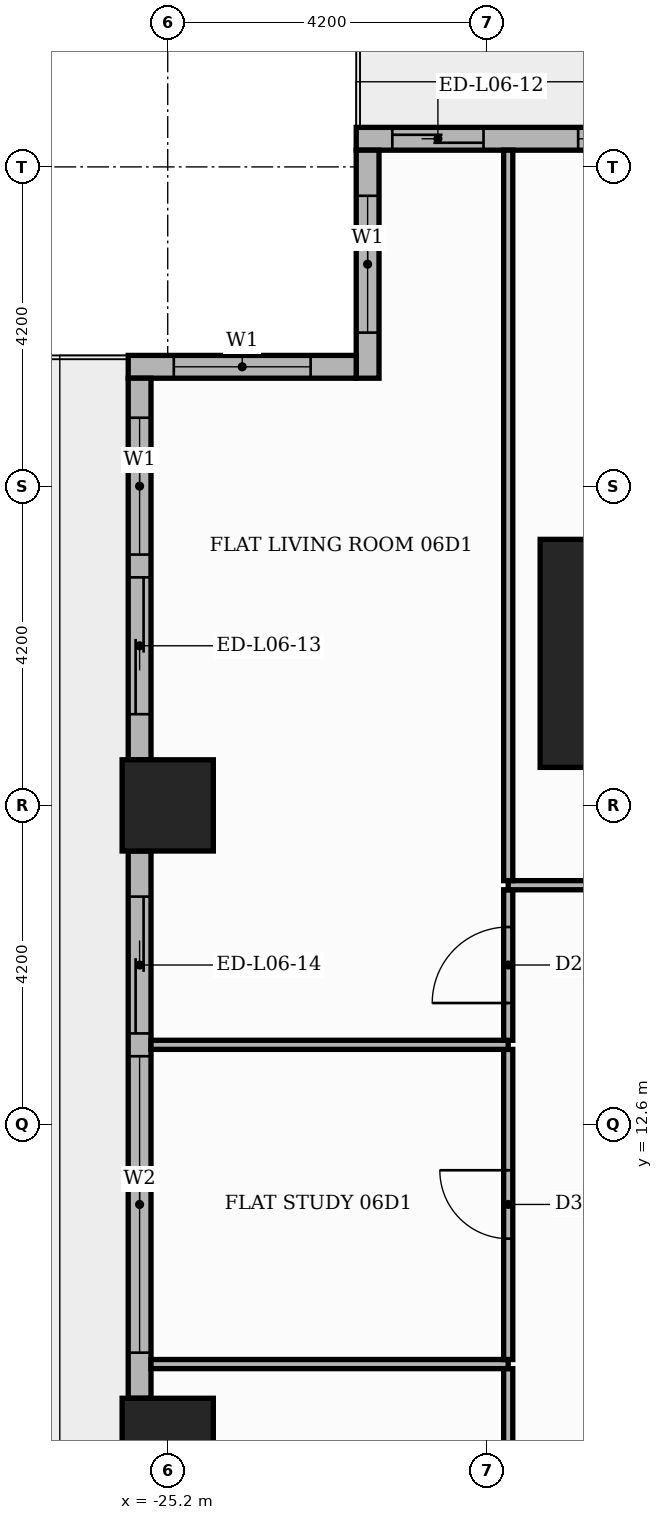
"""IFC4 building model, lengths in metres.
Left out: names, types, materials, properties, quantities, classifications, styles, units other than length and angle.
Written with IfcOpenShell. Run it as: python <this file> out.ifc"""

import sys

from ifc_helpers import new_model, si_unit, direction, frame, frame_2d, origin, origin_2d, place, context, subcontext, project, spatial, rectangle, extrude, element, fill, save


model = new_model("IFC4")
c1 = context("Model", 3, precision=1e-05, world=origin(), true_north=direction((0.0, 1.0)))
c2 = subcontext(c1, "Body", "Model", "MODEL_VIEW")
j1 = project(units=[si_unit("LENGTHUNIT", "METRE"), si_unit("PLANEANGLEUNIT", "RADIAN")], contexts=[c1])
p1 = place(None, origin())
s1 = spatial("IfcSite", under=j1, at=p1, CompositionType="ELEMENT")
p2 = place(p1, origin())
s2 = spatial("IfcBuilding", under=s1, at=p2, CompositionType="ELEMENT")
p3 = place(p2, frame((0.0, 0.0, 30.9)))
s3 = spatial("IfcBuildingStorey", under=s2, at=p3, CompositionType="ELEMENT", Elevation=30.9)
p4 = place(p3, frame((-18.8, 18.8, 0.0), z_axis=(0.0, 0.0, 1.0), x_axis=(1.0, 0.0, 0.0)))
e1 = element("IfcColumn", 1, at=p4, inside=s3, PredefinedType="COLUMN", context=c2, shape_type="SweptSolid", body=[
    extrude(rectangle(XDim=3.0, YDim=3.0, at=origin_2d()), origin(), (0.0, 0.0, 1.0), 3.9),
])
for number, where, z_axis, x_axis in (
    (2, (-25.2, 8.4, 0.0), (0.0, 0.0, 1.0), (1.0, 0.0, 0.0)),
    (3, (-25.2, 16.8, 0.0), (0.0, 0.0, 1.0), (1.0, 0.0, 0.0)),
):
    element("IfcColumn", number, at=place(p3, frame(where, z_axis=z_axis, x_axis=x_axis)), inside=s3, PredefinedType="COLUMN", context=c2, shape_type="SweptSolid", body=[
        extrude(rectangle(XDim=1.2, YDim=1.2, at=origin_2d()), origin(), (0.0, 0.0, 1.0), 3.9),
    ])
p5 = place(p3, frame((-17.4, 25.57, 0.0), z_axis=(0.0, 0.0, 1.0), x_axis=(-1.0, 0.0, 0.0)))
e4 = element("IfcWall", 4, at=p5, inside=s3, PredefinedType="STANDARD", context=c2, shape_type="SweptSolid", body=[
    extrude(rectangle(XDim=5.32, YDim=0.3, at=frame_2d((2.66, 0.0))), origin(), (0.0, 0.0, 1.0), 3.48),
])
p6 = place(p5, frame((0.6, 0.0, 0.9)))
e5 = element("IfcOpeningElement", 5, at=p6, cuts=e4, PredefinedType="OPENING", context=c2, shape_type="SweptSolid", body=[
    extrude(rectangle(XDim=1.8, YDim=2.1, at=frame_2d((0.9, 1.05))), frame((0.0, 0.16, 0.0), z_axis=(0.0, -1.0, 0.0), x_axis=(1.0, 0.0, 0.0)), (0.0, 0.0, 1.0), 0.32),
])
p7 = place(p5, frame((3.645, 0.0, 0.0)))
e6 = element("IfcOpeningElement", 6, at=p7, cuts=e4, PredefinedType="OPENING", context=c2, shape_type="SweptSolid", body=[
    extrude(rectangle(XDim=1.2, YDim=2.4, at=frame_2d((0.6, 1.2))), frame((0.0, 0.16, 0.0), z_axis=(0.0, -1.0, 0.0), x_axis=(1.0, 0.0, 0.0)), (0.0, 0.0, 1.0), 0.32),
])
p8 = place(p3, frame((-22.57, 25.42, 0.0), z_axis=(0.0, 0.0, 1.0), x_axis=(0.0, -1.0, 0.0)))
e7 = element("IfcWall", 7, at=p8, inside=s3, PredefinedType="STANDARD", context=c2, shape_type="SweptSolid", body=[
    extrude(rectangle(XDim=3.0, YDim=0.3, at=frame_2d((1.5, 0.0))), origin(), (0.0, 0.0, 1.0), 3.48),
])
p9 = place(p8, frame((0.6, 0.0, 0.9)))
e8 = element("IfcOpeningElement", 8, at=p9, cuts=e7, PredefinedType="OPENING", context=c2, shape_type="SweptSolid", body=[
    extrude(rectangle(XDim=1.8, YDim=2.1, at=frame_2d((0.9, 1.05))), frame((0.0, 0.16, 0.0), z_axis=(0.0, -1.0, 0.0), x_axis=(1.0, 0.0, 0.0)), (0.0, 0.0, 1.0), 0.32),
])
p10 = place(p3, frame((-22.72, 22.57, 0.0), z_axis=(0.0, 0.0, 1.0), x_axis=(-1.0, 0.0, 0.0)))
e9 = element("IfcWall", 9, at=p10, inside=s3, PredefinedType="STANDARD", context=c2, shape_type="SweptSolid", body=[
    extrude(rectangle(XDim=3.0, YDim=0.3, at=frame_2d((1.5, 0.0))), origin(), (0.0, 0.0, 1.0), 3.48),
])
p11 = place(p10, frame((0.6, 0.0, 0.9)))
e10 = element("IfcOpeningElement", 10, at=p11, cuts=e9, PredefinedType="OPENING", context=c2, shape_type="SweptSolid", body=[
    extrude(rectangle(XDim=1.8, YDim=2.1, at=frame_2d((0.9, 1.05))), frame((0.0, 0.16, 0.0), z_axis=(0.0, -1.0, 0.0), x_axis=(1.0, 0.0, 0.0)), (0.0, 0.0, 1.0), 0.32),
])
p12 = place(p3, frame((-25.57, 22.42, 0.0), z_axis=(0.0, 0.0, 1.0), x_axis=(0.0, -1.0, 0.0)))
e11 = element("IfcWall", 11, at=p12, inside=s3, PredefinedType="STANDARD", context=c2, shape_type="SweptSolid", body=[
    extrude(rectangle(XDim=5.02, YDim=0.3, at=frame_2d((2.51, 0.0))), origin(), (0.0, 0.0, 1.0), 3.48),
])
p13 = place(p12, frame((0.52, 0.0, 0.9)))
e12 = element("IfcOpeningElement", 12, at=p13, cuts=e11, PredefinedType="OPENING", context=c2, shape_type="SweptSolid", body=[
    extrude(rectangle(XDim=1.8, YDim=2.1, at=frame_2d((0.9, 1.05))), frame((0.0, 0.16, 0.0), z_axis=(0.0, -1.0, 0.0), x_axis=(1.0, 0.0, 0.0)), (0.0, 0.0, 1.0), 0.32),
])
p14 = place(p12, frame((2.62, 0.0, 0.0)))
e13 = element("IfcOpeningElement", 13, at=p14, cuts=e11, PredefinedType="OPENING", context=c2, shape_type="SweptSolid", body=[
    extrude(rectangle(XDim=1.8, YDim=2.4, at=frame_2d((0.9, 1.2))), frame((0.0, 0.16, 0.0), z_axis=(0.0, -1.0, 0.0), x_axis=(1.0, 0.0, 0.0)), (0.0, 0.0, 1.0), 0.32),
])
p15 = place(p3, frame((-25.57, 16.2, 0.0), z_axis=(0.0, 0.0, 1.0), x_axis=(0.0, -1.0, 0.0)))
e14 = element("IfcWall", 14, at=p15, inside=s3, PredefinedType="STANDARD", context=c2, shape_type="SweptSolid", body=[
    extrude(rectangle(XDim=7.2, YDim=0.3, at=frame_2d((3.6, 0.0))), origin(), (0.0, 0.0, 1.0), 3.48),
])
p16 = place(p15, frame((0.6, 0.0, 0.0)))
e15 = element("IfcOpeningElement", 15, at=p16, cuts=e14, PredefinedType="OPENING", context=c2, shape_type="SweptSolid", body=[
    extrude(rectangle(XDim=1.8, YDim=2.4, at=frame_2d((0.9, 1.2))), frame((0.0, 0.16, 0.0), z_axis=(0.0, -1.0, 0.0), x_axis=(1.0, 0.0, 0.0)), (0.0, 0.0, 1.0), 0.32),
])
p17 = place(p15, frame((2.7, 0.0, 0.9)))
e16 = element("IfcOpeningElement", 16, at=p17, cuts=e14, PredefinedType="OPENING", context=c2, shape_type="SweptSolid", body=[
    extrude(rectangle(XDim=3.9, YDim=2.1, at=frame_2d((1.95, 1.05))), frame((0.0, 0.16, 0.0), z_axis=(0.0, -1.0, 0.0), x_axis=(1.0, 0.0, 0.0)), (0.0, 0.0, 1.0), 0.32),
])
p18 = place(p3, frame((-20.72, 3.21, 0.0), z_axis=(0.0, 0.0, 1.0), x_axis=(0.0, 1.0, 0.0)))
e17 = element("IfcWall", 17, at=p18, inside=s3, PredefinedType="PARTITIONING", context=c2, shape_type="SweptSolid", body=[
    extrude(rectangle(XDim=6.18, YDim=0.12, at=frame_2d((3.09, 0.0))), origin(), (0.0, 0.0, 1.0), 3.48),
])
p19 = place(p18, frame((2.64, 0.0, 0.0)))
e18 = element("IfcOpeningElement", 18, at=p19, cuts=e17, PredefinedType="OPENING", context=c2, shape_type="SweptSolid", body=[
    extrude(rectangle(XDim=0.9, YDim=2.1, at=frame_2d((0.45, 1.05))), frame((0.0, 0.07, 0.0), z_axis=(0.0, -1.0, 0.0), x_axis=(1.0, 0.0, 0.0)), (0.0, 0.0, 1.0), 0.14),
])
p20 = place(p3, frame((-25.42, 9.45, 0.0), z_axis=(0.0, 0.0, 1.0), x_axis=(1.0, 0.0, 0.0)))
e19 = element("IfcWall", 19, at=p20, inside=s3, PredefinedType="PARTITIONING", context=c2, shape_type="SweptSolid", body=[
    extrude(rectangle(XDim=4.7, YDim=0.12, at=frame_2d((2.35, 0.0))), origin(), (0.0, 0.0, 1.0), 3.48),
])
p21 = place(p3, frame((-20.72, 9.51, 0.0), z_axis=(0.0, 0.0, 1.0), x_axis=(0.0, 1.0, 0.0)))
e20 = element("IfcWall", 20, at=p21, inside=s3, PredefinedType="PARTITIONING", context=c2, shape_type="SweptSolid", body=[
    extrude(rectangle(XDim=4.08, YDim=0.12, at=frame_2d((2.04, 0.0))), origin(), (0.0, 0.0, 1.0), 3.48),
])
p22 = place(p21, frame((1.59, 0.0, 0.0)))
e21 = element("IfcOpeningElement", 21, at=p22, cuts=e20, PredefinedType="OPENING", context=c2, shape_type="SweptSolid", body=[
    extrude(rectangle(XDim=0.9, YDim=2.1, at=frame_2d((0.45, 1.05))), frame((0.0, 0.07, 0.0), z_axis=(0.0, -1.0, 0.0), x_axis=(1.0, 0.0, 0.0)), (0.0, 0.0, 1.0), 0.14),
])
p23 = place(p3, frame((-25.42, 13.65, 0.0), z_axis=(0.0, 0.0, 1.0), x_axis=(1.0, 0.0, 0.0)))
e22 = element("IfcWall", 22, at=p23, inside=s3, PredefinedType="PARTITIONING", context=c2, shape_type="SweptSolid", body=[
    extrude(rectangle(XDim=4.7, YDim=0.12, at=frame_2d((2.35, 0.0))), origin(), (0.0, 0.0, 1.0), 3.48),
])
p24 = place(p3, frame((-20.72, 13.71, 0.0), z_axis=(0.0, 0.0, 1.0), x_axis=(0.0, 1.0, 0.0)))
e23 = element("IfcWall", 23, at=p24, inside=s3, PredefinedType="PARTITIONING", context=c2, shape_type="SweptSolid", body=[
    extrude(rectangle(XDim=1.98, YDim=0.12, at=frame_2d((0.99, 0.0))), origin(), (0.0, 0.0, 1.0), 3.48),
])
p25 = place(p24, frame((0.49, 0.0, 0.0)))
e24 = element("IfcOpeningElement", 24, at=p25, cuts=e23, PredefinedType="OPENING", context=c2, shape_type="SweptSolid", body=[
    extrude(rectangle(XDim=1.0, YDim=2.1, at=frame_2d((0.5, 1.05))), frame((0.0, 0.07, 0.0), z_axis=(0.0, -1.0, 0.0), x_axis=(1.0, 0.0, 0.0)), (0.0, 0.0, 1.0), 0.14),
])
p26 = place(p3, frame((-20.72, 15.75, 0.0), z_axis=(0.0, 0.0, 1.0), x_axis=(1.0, 0.0, 0.0)))
e25 = element("IfcWall", 25, at=p26, inside=s3, PredefinedType="PARTITIONING", context=c2, shape_type="SweptSolid", body=[
    extrude(rectangle(XDim=6.97, YDim=0.12, at=frame_2d((3.485, 0.0))), origin(), (0.0, 0.0, 1.0), 3.48),
])
p27 = place(p26, frame((3.085, 0.0, 0.0)))
e26 = element("IfcOpeningElement", 26, at=p27, cuts=e25, PredefinedType="OPENING", context=c2, shape_type="SweptSolid", body=[
    extrude(rectangle(XDim=0.9, YDim=2.1, at=frame_2d((0.45, 1.05))), frame((0.0, 0.07, 0.0), z_axis=(0.0, -1.0, 0.0), x_axis=(1.0, 0.0, 0.0)), (0.0, 0.0, 1.0), 0.14),
])
p28 = place(p3, frame((-20.72, 15.81, 0.0), z_axis=(0.0, 0.0, 1.0), x_axis=(0.0, 1.0, 0.0)))
e27 = element("IfcWall", 27, at=p28, inside=s3, PredefinedType="PARTITIONING", context=c2, shape_type="SweptSolid", body=[
    extrude(rectangle(XDim=9.61, YDim=0.12, at=frame_2d((4.805, 0.0))), origin(), (0.0, 0.0, 1.0), 3.48),
])
p29 = place(p6, origin())
e28 = element("IfcWindow", 28, at=p29, inside=s3, PartitioningType="SINGLE_PANEL", PredefinedType="WINDOW", context=c2, shape_type="SweptSolid", body=[
    extrude(rectangle(XDim=1.8, YDim=2.1, at=frame_2d((0.9, 1.05))), frame((0.0, 0.03, 0.0), z_axis=(0.0, -1.0, 0.0), x_axis=(1.0, 0.0, 0.0)), (0.0, 0.0, 1.0), 0.06),
])
fill(e5, e28)
p30 = place(p7, origin())
e29 = element("IfcDoor", 29, at=p30, inside=s3, OperationType="SLIDING_TO_RIGHT", PredefinedType="DOOR", context=c2, shape_type="SweptSolid", body=[
    extrude(rectangle(XDim=1.2, YDim=2.4, at=frame_2d((0.6, 1.2))), frame((0.0, 0.025, 0.0), z_axis=(0.0, -1.0, 0.0), x_axis=(1.0, 0.0, 0.0)), (0.0, 0.0, 1.0), 0.05),
])
fill(e6, e29)
p31 = place(p9, origin())
e30 = element("IfcWindow", 30, at=p31, inside=s3, PartitioningType="SINGLE_PANEL", PredefinedType="WINDOW", context=c2, shape_type="SweptSolid", body=[
    extrude(rectangle(XDim=1.8, YDim=2.1, at=frame_2d((0.9, 1.05))), frame((0.0, 0.03, 0.0), z_axis=(0.0, -1.0, 0.0), x_axis=(1.0, 0.0, 0.0)), (0.0, 0.0, 1.0), 0.06),
])
fill(e8, e30)
p32 = place(p11, origin())
e31 = element("IfcWindow", 31, at=p32, inside=s3, PartitioningType="SINGLE_PANEL", PredefinedType="WINDOW", context=c2, shape_type="SweptSolid", body=[
    extrude(rectangle(XDim=1.8, YDim=2.1, at=frame_2d((0.9, 1.05))), frame((0.0, 0.03, 0.0), z_axis=(0.0, -1.0, 0.0), x_axis=(1.0, 0.0, 0.0)), (0.0, 0.0, 1.0), 0.06),
])
fill(e10, e31)
p33 = place(p13, origin())
e32 = element("IfcWindow", 32, at=p33, inside=s3, PartitioningType="SINGLE_PANEL", PredefinedType="WINDOW", context=c2, shape_type="SweptSolid", body=[
    extrude(rectangle(XDim=1.8, YDim=2.1, at=frame_2d((0.9, 1.05))), frame((0.0, 0.03, 0.0), z_axis=(0.0, -1.0, 0.0), x_axis=(1.0, 0.0, 0.0)), (0.0, 0.0, 1.0), 0.06),
])
fill(e12, e32)
p34 = place(p14, origin())
e33 = element("IfcDoor", 33, at=p34, inside=s3, OperationType="SLIDING_TO_RIGHT", PredefinedType="DOOR", context=c2, shape_type="SweptSolid", body=[
    extrude(rectangle(XDim=1.8, YDim=2.4, at=frame_2d((0.9, 1.2))), frame((0.0, 0.025, 0.0), z_axis=(0.0, -1.0, 0.0), x_axis=(1.0, 0.0, 0.0)), (0.0, 0.0, 1.0), 0.05),
])
fill(e13, e33)
p35 = place(p16, origin())
e34 = element("IfcDoor", 34, at=p35, inside=s3, OperationType="SLIDING_TO_LEFT", PredefinedType="DOOR", context=c2, shape_type="SweptSolid", body=[
    extrude(rectangle(XDim=1.8, YDim=2.4, at=frame_2d((0.9, 1.2))), frame((0.0, 0.025, 0.0), z_axis=(0.0, -1.0, 0.0), x_axis=(1.0, 0.0, 0.0)), (0.0, 0.0, 1.0), 0.05),
])
fill(e15, e34)
p36 = place(p17, origin())
e35 = element("IfcWindow", 35, at=p36, inside=s3, PartitioningType="SINGLE_PANEL", PredefinedType="WINDOW", context=c2, shape_type="SweptSolid", body=[
    extrude(rectangle(XDim=3.9, YDim=2.1, at=frame_2d((1.95, 1.05))), frame((0.0, 0.03, 0.0), z_axis=(0.0, -1.0, 0.0), x_axis=(1.0, 0.0, 0.0)), (0.0, 0.0, 1.0), 0.06),
])
fill(e16, e35)
p37 = place(p25, origin())
e36 = element("IfcDoor", 36, at=p37, inside=s3, OperationType="SINGLE_SWING_LEFT", PredefinedType="DOOR", context=c2, shape_type="SweptSolid", body=[
    extrude(rectangle(XDim=1.0, YDim=2.1, at=frame_2d((0.5, 1.05))), frame((0.0, 0.025, 0.0), z_axis=(0.0, -1.0, 0.0), x_axis=(1.0, 0.0, 0.0)), (0.0, 0.0, 1.0), 0.05),
])
fill(e24, e36)
p38 = place(p22, origin())
e37 = element("IfcDoor", 37, at=p38, inside=s3, OperationType="SINGLE_SWING_RIGHT", PredefinedType="DOOR", context=c2, shape_type="SweptSolid", body=[
    extrude(rectangle(XDim=0.9, YDim=2.1, at=frame_2d((0.45, 1.05))), frame((0.0, 0.025, 0.0), z_axis=(0.0, -1.0, 0.0), x_axis=(1.0, 0.0, 0.0)), (0.0, 0.0, 1.0), 0.05),
])
fill(e21, e37)
save(model, sys.argv[1])
